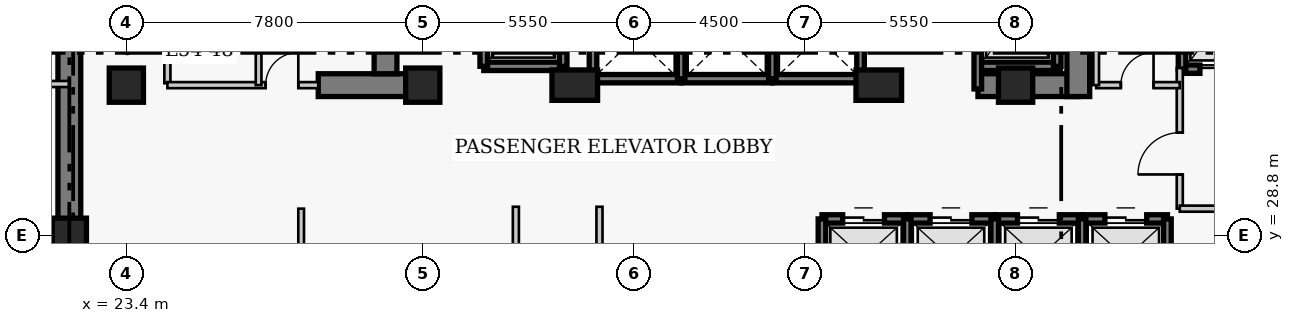
"""IFC4 building model, lengths in metres.
Left out: names, types, materials, properties, quantities, classifications, styles, units other than length and angle.
Written with IfcOpenShell. Run it as: python <this file> out.ifc"""

import sys

from ifc_helpers import new_model, si_unit, direction, frame, frame_2d, origin, origin_2d, place, context, subcontext, project, spatial, rectangle, extrude, element, fill, save


model = new_model("IFC4")
c1 = context("Model", 3, precision=1e-05, world=origin(), true_north=direction((0.0, 1.0)))
c2 = subcontext(c1, "Body", "Model", "MODEL_VIEW")
j1 = project(units=[si_unit("LENGTHUNIT", "METRE"), si_unit("PLANEANGLEUNIT", "RADIAN")], contexts=[c1])
p1 = place(None, origin())
s1 = spatial("IfcSite", under=j1, at=p1, CompositionType="ELEMENT")
p2 = place(p1, origin())
s2 = spatial("IfcBuilding", under=s1, at=p2, CompositionType="ELEMENT")
p3 = place(p2, frame((0.0, 0.0, 216.3)))
s3 = spatial("IfcBuildingStorey", under=s2, at=p3, CompositionType="ELEMENT", Elevation=216.3)
p4 = place(p3, frame((21.9, 27.05, 0.0), z_axis=(0.0, 0.0, 1.0), x_axis=(0.0, 1.0, 0.0)))
e1 = element("IfcWall", 1, at=p4, inside=s3, PredefinedType="SHEAR", context=c2, shape_type="SweptSolid", body=[
    extrude(rectangle(XDim=13.57, YDim=0.6, at=frame_2d((6.785, 0.0))), origin(), (0.0, 0.0, 1.0), 3.9),
])
p5 = place(p3, frame((28.45, 32.75, 0.0), z_axis=(0.0, 0.0, 1.0), x_axis=(1.0, 0.0, 0.0)))
e2 = element("IfcWall", 2, at=p5, inside=s3, PredefinedType="SHEAR", context=c2, shape_type="SweptSolid", body=[
    extrude(rectangle(XDim=2.4, YDim=0.6, at=frame_2d((1.2, 0.0))), origin(), (0.0, 0.0, 1.0), 3.9),
])
p6 = place(p3, frame((45.81, 32.75, 0.0), z_axis=(0.0, 0.0, 1.0), x_axis=(1.0, 0.0, 0.0)))
e3 = element("IfcWall", 3, at=p6, inside=s3, PredefinedType="SHEAR", context=c2, shape_type="SweptSolid", body=[
    extrude(rectangle(XDim=2.64, YDim=0.6, at=frame_2d((1.32, 0.0))), origin(), (0.0, 0.0, 1.0), 3.9),
])
p7 = place(p3, frame((30.22, 33.05, 0.0), z_axis=(0.0, 0.0, 1.0), x_axis=(0.0, 1.0, 0.0)))
e4 = element("IfcWall", 4, at=p7, inside=s3, PredefinedType="SHEAR", context=c2, shape_type="SweptSolid", body=[
    extrude(rectangle(XDim=7.27, YDim=0.6, at=frame_2d((3.635, 0.0))), origin(), (0.0, 0.0, 1.0), 3.9),
])
p8 = place(p3, frame((48.45, 32.45, 0.0), z_axis=(0.0, 0.0, 1.0), x_axis=(0.0, 1.0, 0.0)))
e5 = element("IfcWall", 5, at=p8, inside=s3, PredefinedType="SHEAR", context=c2, shape_type="SweptSolid", body=[
    extrude(rectangle(XDim=7.87, YDim=0.6, at=frame_2d((3.935, 0.0))), origin(), (0.0, 0.0, 1.0), 3.9),
])
p9 = place(p8, frame((5.75, 0.0, 0.0)))
e6 = element("IfcOpeningElement", 6, at=p9, cuts=e5, PredefinedType="OPENING", context=c2, shape_type="SweptSolid", body=[
    extrude(rectangle(XDim=1.1, YDim=2.15, at=frame_2d((0.55, 1.075))), frame((0.0, 0.31, 0.0), z_axis=(0.0, -1.0, 0.0), x_axis=(1.0, 0.0, 0.0)), (0.0, 0.0, 1.0), 0.62),
])
for number, where, z_axis, x_axis in (
    (7, (21.9, 28.8, 0.0), (0.0, 0.0, 1.0), (1.0, 0.0, 0.0)),
    (8, (23.4, 32.75, 0.0), (0.0, 0.0, 1.0), (1.0, 0.0, 0.0)),
    (9, (31.2, 32.75, 0.0), (0.0, 0.0, 1.0), (1.0, 0.0, 0.0)),
):
    element("IfcColumn", number, at=place(p3, frame(where, z_axis=z_axis, x_axis=x_axis)), inside=s3, PredefinedType="COLUMN", context=c2, shape_type="SweptSolid", body=[
        extrude(rectangle(XDim=0.9, YDim=0.9, at=origin_2d()), origin(), (0.0, 0.0, 1.0), 3.9),
    ])
for number, where, z_axis, x_axis in (
    (10, (35.2, 32.75, 0.0), (0.0, 0.0, 1.0), (1.0, 0.0, 0.0)),
    (11, (43.2, 32.75, 0.0), (0.0, 0.0, 1.0), (1.0, 0.0, 0.0)),
):
    element("IfcColumn", number, at=place(p3, frame(where, z_axis=z_axis, x_axis=x_axis)), inside=s3, PredefinedType="COLUMN", context=c2, shape_type="SweptSolid", body=[
        extrude(rectangle(XDim=1.2, YDim=0.8, at=origin_2d()), origin(), (0.0, 0.0, 1.0), 3.9),
    ])
p10 = place(p3, frame((46.8, 32.75, 0.0), z_axis=(0.0, 0.0, 1.0), x_axis=(1.0, 0.0, 0.0)))
e12 = element("IfcColumn", 12, at=p10, inside=s3, PredefinedType="COLUMN", context=c2, shape_type="SweptSolid", body=[
    extrude(rectangle(XDim=0.9, YDim=0.9, at=origin_2d()), origin(), (0.0, 0.0, 1.0), 3.9),
])
p11 = place(p3, frame((41.705, 29.23, 0.0), z_axis=(0.0, 0.0, 1.0), x_axis=(1.0, 0.0, 0.0)))
e13 = element("IfcWall", 13, at=p11, inside=s3, PredefinedType="SHEAR", context=c2, shape_type="SweptSolid", body=[
    extrude(rectangle(XDim=2.245, YDim=0.22, at=frame_2d((1.123, 0.0))), origin(), (0.0, 0.0, 1.0), 3.9),
])
p12 = place(p11, frame((0.545, 0.0, 0.0)))
e14 = element("IfcOpeningElement", 14, at=p12, cuts=e13, PredefinedType="OPENING", context=c2, shape_type="SweptSolid", body=[
    extrude(rectangle(XDim=1.1, YDim=2.15, at=frame_2d((0.55, 1.075))), frame((0.0, 0.12, 0.0), z_axis=(0.0, -1.0, 0.0), x_axis=(1.0, 0.0, 0.0)), (0.0, 0.0, 1.0), 0.24),
])
p13 = place(p3, frame((41.705, 27.17, 0.0), z_axis=(0.0, 0.0, 1.0), x_axis=(0.0, 1.0, 0.0)))
e15 = element("IfcWall", 15, at=p13, inside=s3, PredefinedType="SHEAR", context=c2, shape_type="SweptSolid", body=[
    extrude(rectangle(XDim=2.06, YDim=0.2, at=frame_2d((1.03, 0.0))), origin(), (0.0, 0.0, 1.0), 3.9),
])
p14 = place(p3, frame((43.95, 29.23, 0.0), z_axis=(0.0, 0.0, 1.0), x_axis=(1.0, 0.0, 0.0)))
e16 = element("IfcWall", 16, at=p14, inside=s3, PredefinedType="SHEAR", context=c2, shape_type="SweptSolid", body=[
    extrude(rectangle(XDim=2.3, YDim=0.22, at=frame_2d((1.15, 0.0))), origin(), (0.0, 0.0, 1.0), 3.9),
])
p15 = place(p14, frame((0.6, 0.0, 0.0)))
e17 = element("IfcOpeningElement", 17, at=p15, cuts=e16, PredefinedType="OPENING", context=c2, shape_type="SweptSolid", body=[
    extrude(rectangle(XDim=1.1, YDim=2.15, at=frame_2d((0.55, 1.075))), frame((0.0, 0.12, 0.0), z_axis=(0.0, -1.0, 0.0), x_axis=(1.0, 0.0, 0.0)), (0.0, 0.0, 1.0), 0.24),
])
p16 = place(p3, frame((43.95, 27.17, 0.0), z_axis=(0.0, 0.0, 1.0), x_axis=(0.0, 1.0, 0.0)))
e18 = element("IfcWall", 18, at=p16, inside=s3, PredefinedType="SHEAR", context=c2, shape_type="SweptSolid", body=[
    extrude(rectangle(XDim=2.06, YDim=0.2, at=frame_2d((1.03, 0.0))), origin(), (0.0, 0.0, 1.0), 3.9),
])
p17 = place(p3, frame((46.25, 29.23, 0.0), z_axis=(0.0, 0.0, 1.0), x_axis=(1.0, 0.0, 0.0)))
e19 = element("IfcWall", 19, at=p17, inside=s3, PredefinedType="SHEAR", context=c2, shape_type="SweptSolid", body=[
    extrude(rectangle(XDim=2.3, YDim=0.22, at=frame_2d((1.15, 0.0))), origin(), (0.0, 0.0, 1.0), 3.9),
])
p18 = place(p17, frame((0.6, 0.0, 0.0)))
e20 = element("IfcOpeningElement", 20, at=p18, cuts=e19, PredefinedType="OPENING", context=c2, shape_type="SweptSolid", body=[
    extrude(rectangle(XDim=1.1, YDim=2.15, at=frame_2d((0.55, 1.075))), frame((0.0, 0.12, 0.0), z_axis=(0.0, -1.0, 0.0), x_axis=(1.0, 0.0, 0.0)), (0.0, 0.0, 1.0), 0.24),
])
p19 = place(p3, frame((46.25, 27.17, 0.0), z_axis=(0.0, 0.0, 1.0), x_axis=(0.0, 1.0, 0.0)))
e21 = element("IfcWall", 21, at=p19, inside=s3, PredefinedType="SHEAR", context=c2, shape_type="SweptSolid", body=[
    extrude(rectangle(XDim=2.06, YDim=0.2, at=frame_2d((1.03, 0.0))), origin(), (0.0, 0.0, 1.0), 3.9),
])
p20 = place(p3, frame((48.55, 29.23, 0.0), z_axis=(0.0, 0.0, 1.0), x_axis=(1.0, 0.0, 0.0)))
e22 = element("IfcWall", 22, at=p20, inside=s3, PredefinedType="SHEAR", context=c2, shape_type="SweptSolid", body=[
    extrude(rectangle(XDim=2.245, YDim=0.22, at=frame_2d((1.123, 0.0))), origin(), (0.0, 0.0, 1.0), 3.9),
])
p21 = place(p20, frame((0.6, 0.0, 0.0)))
e23 = element("IfcOpeningElement", 23, at=p21, cuts=e22, PredefinedType="OPENING", context=c2, shape_type="SweptSolid", body=[
    extrude(rectangle(XDim=1.1, YDim=2.15, at=frame_2d((0.55, 1.075))), frame((0.0, 0.12, 0.0), z_axis=(0.0, -1.0, 0.0), x_axis=(1.0, 0.0, 0.0)), (0.0, 0.0, 1.0), 0.24),
])
for number, where, z_axis, x_axis in (
    (24, (48.55, 27.17, 0.0), (0.0, 0.0, 1.0), (0.0, 1.0, 0.0)),
    (25, (50.795, 27.17, 0.0), (0.0, 0.0, 1.0), (0.0, 1.0, 0.0)),
):
    element("IfcWall", number, at=place(p3, frame(where, z_axis=z_axis, x_axis=x_axis)), inside=s3, PredefinedType="SHEAR", context=c2, shape_type="SweptSolid", body=[
        extrude(rectangle(XDim=2.06, YDim=0.2, at=frame_2d((1.03, 0.0))), origin(), (0.0, 0.0, 1.0), 3.9),
    ])
p22 = place(p3, frame((35.68, 32.92, 0.0), z_axis=(0.0, 0.0, 1.0), x_axis=(1.0, 0.0, 0.0)))
e26 = element("IfcWall", 26, at=p22, inside=s3, PredefinedType="SHEAR", context=c2, shape_type="SweptSolid", body=[
    extrude(rectangle(XDim=2.32, YDim=0.22, at=frame_2d((1.16, 0.0))), origin(), (0.0, 0.0, 1.0), 3.9),
])
p23 = place(p3, frame((35.68, 32.92, 0.0), z_axis=(0.0, 0.0, 1.0), x_axis=(0.0, 1.0, 0.0)))
e27 = element("IfcWall", 27, at=p23, inside=s3, PredefinedType="SHEAR", context=c2, shape_type="SweptSolid", body=[
    extrude(rectangle(XDim=2.16, YDim=0.2, at=frame_2d((1.08, 0.0))), origin(), (0.0, 0.0, 1.0), 3.9),
])
p24 = place(p3, frame((38.0, 32.92, 0.0), z_axis=(0.0, 0.0, 1.0), x_axis=(1.0, 0.0, 0.0)))
e28 = element("IfcWall", 28, at=p24, inside=s3, PredefinedType="SHEAR", context=c2, shape_type="SweptSolid", body=[
    extrude(rectangle(XDim=2.4, YDim=0.22, at=frame_2d((1.2, 0.0))), origin(), (0.0, 0.0, 1.0), 3.9),
])
p25 = place(p3, frame((38.0, 32.92, 0.0), z_axis=(0.0, 0.0, 1.0), x_axis=(0.0, 1.0, 0.0)))
e29 = element("IfcWall", 29, at=p25, inside=s3, PredefinedType="SHEAR", context=c2, shape_type="SweptSolid", body=[
    extrude(rectangle(XDim=2.16, YDim=0.2, at=frame_2d((1.08, 0.0))), origin(), (0.0, 0.0, 1.0), 3.9),
])
p26 = place(p3, frame((40.4, 32.92, 0.0), z_axis=(0.0, 0.0, 1.0), x_axis=(1.0, 0.0, 0.0)))
e30 = element("IfcWall", 30, at=p26, inside=s3, PredefinedType="SHEAR", context=c2, shape_type="SweptSolid", body=[
    extrude(rectangle(XDim=2.32, YDim=0.22, at=frame_2d((1.16, 0.0))), origin(), (0.0, 0.0, 1.0), 3.9),
])
for number, where, z_axis, x_axis in (
    (31, (40.4, 32.92, 0.0), (0.0, 0.0, 1.0), (0.0, 1.0, 0.0)),
    (32, (42.72, 32.92, 0.0), (0.0, 0.0, 1.0), (0.0, 1.0, 0.0)),
):
    element("IfcWall", number, at=place(p3, frame(where, z_axis=z_axis, x_axis=x_axis)), inside=s3, PredefinedType="SHEAR", context=c2, shape_type="SweptSolid", body=[
        extrude(rectangle(XDim=2.16, YDim=0.2, at=frame_2d((1.08, 0.0))), origin(), (0.0, 0.0, 1.0), 3.9),
    ])
p27 = place(p3, frame((51.18, 33.17, 0.0), z_axis=(0.0, 0.0, 1.0), x_axis=(1.0, 0.0, 0.0)))
e33 = element("IfcWall", 33, at=p27, inside=s3, PredefinedType="SHEAR", context=c2, shape_type="SweptSolid", body=[
    extrude(rectangle(XDim=2.42, YDim=0.22, at=frame_2d((1.21, 0.0))), origin(), (0.0, 0.0, 1.0), 3.9),
])
p28 = place(p27, frame((0.47, 0.0, 0.0)))
e34 = element("IfcOpeningElement", 34, at=p28, cuts=e33, PredefinedType="OPENING", context=c2, shape_type="SweptSolid", body=[
    extrude(rectangle(XDim=1.3, YDim=2.15, at=frame_2d((0.65, 1.075))), frame((0.0, 0.12, 0.0), z_axis=(0.0, -1.0, 0.0), x_axis=(1.0, 0.0, 0.0)), (0.0, 0.0, 1.0), 0.24),
])
p29 = place(p3, frame((51.18, 33.17, 0.0), z_axis=(0.0, 0.0, 1.0), x_axis=(0.0, 1.0, 0.0)))
e35 = element("IfcWall", 35, at=p29, inside=s3, PredefinedType="SHEAR", context=c2, shape_type="SweptSolid", body=[
    extrude(rectangle(XDim=2.86, YDim=0.2, at=frame_2d((1.43, 0.0))), origin(), (0.0, 0.0, 1.0), 3.9),
])
p30 = place(p3, frame((32.805, 33.245, 0.0), z_axis=(0.0, 0.0, 1.0), x_axis=(1.0, 0.0, 0.0)))
e36 = element("IfcWall", 36, at=p30, inside=s3, PredefinedType="SHEAR", context=c2, shape_type="SweptSolid", body=[
    extrude(rectangle(XDim=2.09, YDim=0.22, at=frame_2d((1.045, 0.0))), origin(), (0.0, 0.0, 1.0), 3.9),
])
for number, where, z_axis, x_axis in (
    (37, (32.805, 33.245, 0.0), (0.0, 0.0, 1.0), (0.0, 1.0, 0.0)),
    (38, (34.895, 33.245, 0.0), (0.0, 0.0, 1.0), (0.0, 1.0, 0.0)),
):
    element("IfcWall", number, at=place(p3, frame(where, z_axis=z_axis, x_axis=x_axis)), inside=s3, PredefinedType="SHEAR", context=c2, shape_type="SweptSolid", body=[
        extrude(rectangle(XDim=2.91, YDim=0.2, at=frame_2d((1.455, 0.0))), origin(), (0.0, 0.0, 1.0), 3.9),
    ])
p31 = place(p3, frame((45.805, 33.245, 0.0), z_axis=(0.0, 0.0, 1.0), x_axis=(1.0, 0.0, 0.0)))
e39 = element("IfcWall", 39, at=p31, inside=s3, PredefinedType="SHEAR", context=c2, shape_type="SweptSolid", body=[
    extrude(rectangle(XDim=2.09, YDim=0.22, at=frame_2d((1.045, 0.0))), origin(), (0.0, 0.0, 1.0), 3.9),
])
p32 = place(p3, frame((45.805, 32.65, 0.0), z_axis=(0.0, 0.0, 1.0), x_axis=(0.0, 1.0, 0.0)))
e40 = element("IfcWall", 40, at=p32, inside=s3, PredefinedType="SHEAR", context=c2, shape_type="SweptSolid", body=[
    extrude(rectangle(XDim=3.505, YDim=0.2, at=frame_2d((1.752, 0.0))), origin(), (0.0, 0.0, 1.0), 3.9),
])
p33 = place(p3, frame((47.895, 33.245, 0.0), z_axis=(0.0, 0.0, 1.0), x_axis=(0.0, 1.0, 0.0)))
e41 = element("IfcWall", 41, at=p33, inside=s3, PredefinedType="SHEAR", context=c2, shape_type="SweptSolid", body=[
    extrude(rectangle(XDim=2.91, YDim=0.2, at=frame_2d((1.455, 0.0))), origin(), (0.0, 0.0, 1.0), 3.9),
])
p34 = place(p3, frame((24.48, 32.8, 0.0), z_axis=(0.0, 0.0, 1.0), x_axis=(0.0, 1.0, 0.0)))
e42 = element("IfcWall", 42, at=p34, inside=s3, PredefinedType="PARTITIONING", context=c2, shape_type="SweptSolid", body=[
    extrude(rectangle(XDim=3.57, YDim=0.16, at=frame_2d((1.785, 0.0))), origin(), (0.0, 0.0, 1.0), 3.65),
])
p35 = place(p34, frame((1.604, 0.0, 0.0)))
e43 = element("IfcOpeningElement", 43, at=p35, cuts=e42, PredefinedType="OPENING", context=c2, shape_type="SweptSolid", body=[
    extrude(rectangle(XDim=0.9, YDim=2.1, at=frame_2d((0.45, 1.05))), frame((0.0, 0.09, 0.0), z_axis=(0.0, -1.0, 0.0), x_axis=(1.0, 0.0, 0.0)), (0.0, 0.0, 1.0), 0.18),
])
p36 = place(p3, frame((51.12, 29.5, 0.0), z_axis=(0.0, 0.0, 1.0), x_axis=(0.0, 1.0, 0.0)))
e44 = element("IfcWall", 44, at=p36, inside=s3, PredefinedType="PARTITIONING", context=c2, shape_type="SweptSolid", body=[
    extrude(rectangle(XDim=3.7, YDim=0.16, at=frame_2d((1.85, 0.0))), origin(), (0.0, 0.0, 1.0), 3.65),
])
p37 = place(p36, frame((0.9, 0.0, 0.0)))
e45 = element("IfcOpeningElement", 45, at=p37, cuts=e44, PredefinedType="OPENING", context=c2, shape_type="SweptSolid", body=[
    extrude(rectangle(XDim=1.1, YDim=2.15, at=frame_2d((0.55, 1.075))), frame((0.0, 0.09, 0.0), z_axis=(0.0, -1.0, 0.0), x_axis=(1.0, 0.0, 0.0)), (0.0, 0.0, 1.0), 0.18),
])
p38 = place(p3, frame((51.12, 29.5, 0.0), z_axis=(0.0, 0.0, 1.0), x_axis=(1.0, 0.0, 0.0)))
e46 = element("IfcWall", 46, at=p38, inside=s3, PredefinedType="PARTITIONING", context=c2, shape_type="SweptSolid", body=[
    extrude(rectangle(XDim=5.63, YDim=0.16, at=frame_2d((2.815, 0.0))), origin(), (0.0, 0.0, 1.0), 3.65),
])
p39 = place(p3, frame((24.48, 32.75, 0.0), z_axis=(0.0, 0.0, 1.0), x_axis=(1.0, 0.0, 0.0)))
e47 = element("IfcWall", 47, at=p39, inside=s3, PredefinedType="PARTITIONING", context=c2, shape_type="SweptSolid", body=[
    extrude(rectangle(XDim=3.97, YDim=0.16, at=frame_2d((1.985, 0.0))), origin(), (0.0, 0.0, 1.0), 3.65),
])
p40 = place(p39, frame((2.585, 0.0, 0.0)))
e48 = element("IfcOpeningElement", 48, at=p40, cuts=e47, PredefinedType="OPENING", context=c2, shape_type="SweptSolid", body=[
    extrude(rectangle(XDim=0.86, YDim=2.05, at=frame_2d((0.43, 1.025))), frame((0.0, 0.09, 0.0), z_axis=(0.0, -1.0, 0.0), x_axis=(1.0, 0.0, 0.0)), (0.0, 0.0, 1.0), 0.18),
])
p41 = place(p3, frame((48.92, 32.75, 0.0), z_axis=(0.0, 0.0, 1.0), x_axis=(1.0, 0.0, 0.0)))
e49 = element("IfcWall", 49, at=p41, inside=s3, PredefinedType="PARTITIONING", context=c2, shape_type="SweptSolid", body=[
    extrude(rectangle(XDim=2.2, YDim=0.16, at=frame_2d((1.1, 0.0))), origin(), (0.0, 0.0, 1.0), 3.65),
])
p42 = place(p41, frame((0.65, 0.0, 0.0)))
e50 = element("IfcOpeningElement", 50, at=p42, cuts=e49, PredefinedType="OPENING", context=c2, shape_type="SweptSolid", body=[
    extrude(rectangle(XDim=0.86, YDim=2.05, at=frame_2d((0.43, 1.025))), frame((0.0, 0.09, 0.0), z_axis=(0.0, -1.0, 0.0), x_axis=(1.0, 0.0, 0.0)), (0.0, 0.0, 1.0), 0.18),
])
for number, where, z_axis, x_axis in (
    (51, (48.92, 32.75, 0.0), (0.0, 0.0, 1.0), (0.0, 1.0, 0.0)),
    (52, (26.88, 32.75, 0.0), (0.0, 0.0, 1.0), (0.0, 1.0, 0.0)),
):
    element("IfcWall", number, at=place(p3, frame(where, z_axis=z_axis, x_axis=x_axis)), inside=s3, PredefinedType="PARTITIONING", context=c2, shape_type="SweptSolid", body=[
        extrude(rectangle(XDim=3.62, YDim=0.15, at=frame_2d((1.81, 0.0))), origin(), (0.0, 0.0, 1.0), 3.65),
    ])
for number, where, z_axis, x_axis in (
    (53, (33.65, 18.51, 0.0), (0.0, 0.0, 1.0), (0.0, 1.0, 0.0)),
    (54, (35.85, 18.51, 0.0), (0.0, 0.0, 1.0), (0.0, 1.0, 0.0)),
):
    element("IfcWall", number, at=place(p3, frame(where, z_axis=z_axis, x_axis=x_axis)), inside=s3, PredefinedType="PARTITIONING", context=c2, shape_type="SweptSolid", body=[
        extrude(rectangle(XDim=11.04, YDim=0.16, at=frame_2d((5.52, 0.0))), origin(), (0.0, 0.0, 1.0), 3.65),
    ])
p43 = place(p3, frame((19.16, 32.78, 0.0), z_axis=(0.0, 0.0, 1.0), x_axis=(1.0, 0.0, 0.0)))
e55 = element("IfcWall", 55, at=p43, inside=s3, PredefinedType="PARTITIONING", context=c2, shape_type="SweptSolid", body=[
    extrude(rectangle(XDim=2.74, YDim=0.16, at=frame_2d((1.37, 0.0))), origin(), (0.0, 0.0, 1.0), 3.65),
])
p44 = place(p3, frame((28.0, 18.51, 0.0), z_axis=(0.0, 0.0, 1.0), x_axis=(0.0, 1.0, 0.0)))
e56 = element("IfcWall", 56, at=p44, inside=s3, PredefinedType="PARTITIONING", context=c2, shape_type="SweptSolid", body=[
    extrude(rectangle(XDim=10.99, YDim=0.15, at=frame_2d((5.495, 0.0))), origin(), (0.0, 0.0, 1.0), 3.65),
])
p45 = place(p12, origin())
e57 = element("IfcDoor", 57, at=p45, inside=s3, OperationType="DOUBLE_DOOR_SLIDING", PredefinedType="DOOR", context=c2, shape_type="SweptSolid", body=[
    extrude(rectangle(XDim=1.1, YDim=2.15, at=frame_2d((0.55, 1.075))), frame((0.0, 0.025, 0.0), z_axis=(0.0, -1.0, 0.0), x_axis=(1.0, 0.0, 0.0)), (0.0, 0.0, 1.0), 0.05),
])
fill(e14, e57)
p46 = place(p15, origin())
e58 = element("IfcDoor", 58, at=p46, inside=s3, OperationType="DOUBLE_DOOR_SLIDING", PredefinedType="DOOR", context=c2, shape_type="SweptSolid", body=[
    extrude(rectangle(XDim=1.1, YDim=2.15, at=frame_2d((0.55, 1.075))), frame((0.0, 0.025, 0.0), z_axis=(0.0, -1.0, 0.0), x_axis=(1.0, 0.0, 0.0)), (0.0, 0.0, 1.0), 0.05),
])
fill(e17, e58)
p47 = place(p18, origin())
e59 = element("IfcDoor", 59, at=p47, inside=s3, OperationType="DOUBLE_DOOR_SLIDING", PredefinedType="DOOR", context=c2, shape_type="SweptSolid", body=[
    extrude(rectangle(XDim=1.1, YDim=2.15, at=frame_2d((0.55, 1.075))), frame((0.0, 0.025, 0.0), z_axis=(0.0, -1.0, 0.0), x_axis=(1.0, 0.0, 0.0)), (0.0, 0.0, 1.0), 0.05),
])
fill(e20, e59)
p48 = place(p21, origin())
e60 = element("IfcDoor", 60, at=p48, inside=s3, OperationType="DOUBLE_DOOR_SLIDING", PredefinedType="DOOR", context=c2, shape_type="SweptSolid", body=[
    extrude(rectangle(XDim=1.1, YDim=2.15, at=frame_2d((0.55, 1.075))), frame((0.0, 0.025, 0.0), z_axis=(0.0, -1.0, 0.0), x_axis=(1.0, 0.0, 0.0)), (0.0, 0.0, 1.0), 0.05),
])
fill(e23, e60)
p49 = place(p28, origin())
e61 = element("IfcDoor", 61, at=p49, inside=s3, OperationType="DOUBLE_DOOR_SLIDING", PredefinedType="DOOR", context=c2, shape_type="SweptSolid", body=[
    extrude(rectangle(XDim=1.3, YDim=2.15, at=frame_2d((0.65, 1.075))), frame((0.0, 0.025, 0.0), z_axis=(0.0, -1.0, 0.0), x_axis=(1.0, 0.0, 0.0)), (0.0, 0.0, 1.0), 0.05),
])
fill(e34, e61)
p50 = place(p37, origin())
e62 = element("IfcDoor", 62, at=p50, inside=s3, OperationType="SINGLE_SWING_LEFT", PredefinedType="DOOR", context=c2, shape_type="SweptSolid", body=[
    extrude(rectangle(XDim=1.1, YDim=2.15, at=frame_2d((0.55, 1.075))), frame((0.0, 0.025, 0.0), z_axis=(0.0, -1.0, 0.0), x_axis=(1.0, 0.0, 0.0)), (0.0, 0.0, 1.0), 0.05),
])
fill(e45, e62)
p51 = place(p40, origin())
e63 = element("IfcDoor", 63, at=p51, inside=s3, OperationType="SINGLE_SWING_RIGHT", PredefinedType="DOOR", context=c2, shape_type="SweptSolid", body=[
    extrude(rectangle(XDim=0.86, YDim=2.05, at=frame_2d((0.43, 1.025))), frame((0.0, 0.025, 0.0), z_axis=(0.0, -1.0, 0.0), x_axis=(1.0, 0.0, 0.0)), (0.0, 0.0, 1.0), 0.05),
])
fill(e48, e63)
p52 = place(p42, origin())
e64 = element("IfcDoor", 64, at=p52, inside=s3, OperationType="SINGLE_SWING_RIGHT", PredefinedType="DOOR", context=c2, shape_type="SweptSolid", body=[
    extrude(rectangle(XDim=0.86, YDim=2.05, at=frame_2d((0.43, 1.025))), frame((0.0, 0.025, 0.0), z_axis=(0.0, -1.0, 0.0), x_axis=(1.0, 0.0, 0.0)), (0.0, 0.0, 1.0), 0.05),
])
fill(e50, e64)
save(model, sys.argv[1])
